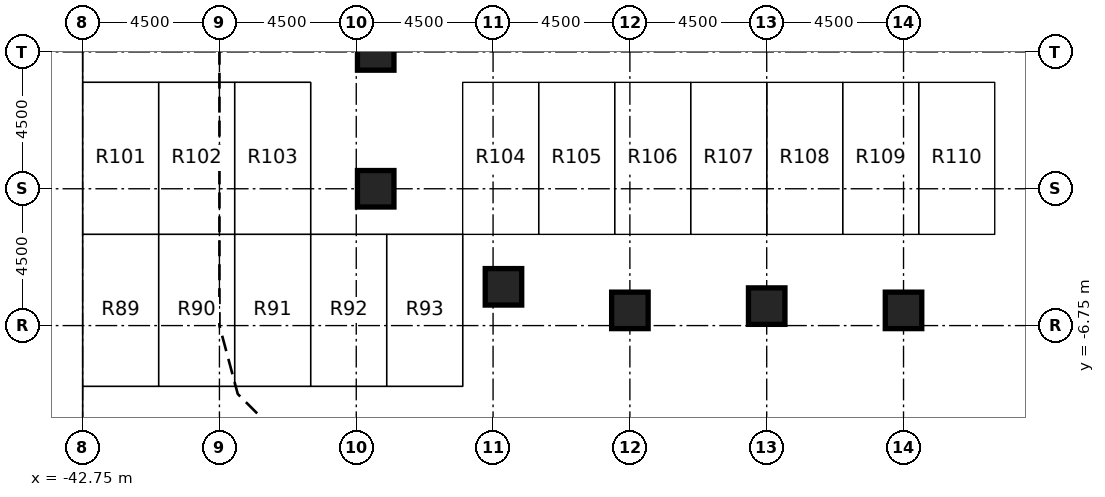
"""IFC4 building model, lengths in metres.
Left out: names, types, materials, properties, quantities, classifications, styles, units other than length and angle.
Written with IfcOpenShell. Run it as: python <this file> out.ifc"""

import sys

from ifc_helpers import new_model, si_unit, direction, frame, origin, origin_2d, place, context, subcontext, project, spatial, rectangle, extrude, element, save


model = new_model("IFC4")
c1 = context("Model", 3, precision=1e-05, world=origin(), true_north=direction((0.0, 1.0)))
c2 = subcontext(c1, "Body", "Model", "MODEL_VIEW")
j1 = project(units=[si_unit("LENGTHUNIT", "METRE"), si_unit("PLANEANGLEUNIT", "RADIAN")], contexts=[c1])
p1 = place(None, origin())
s1 = spatial("IfcSite", under=j1, at=p1, CompositionType="ELEMENT")
p2 = place(p1, origin())
s2 = spatial("IfcBuilding", under=s1, at=p2, CompositionType="ELEMENT")
p3 = place(p2, frame((0.0, 0.0, -8.0)))
s3 = spatial("IfcBuildingStorey", under=s2, at=p3, CompositionType="ELEMENT", Elevation=-8.0)
for number, where, z_axis, x_axis in (
    (1, (-33.11, -2.25, 0.0), (0.0, 0.0, 1.0), (1.0, 0.0, 0.0)),
    (2, (-33.11, 2.25, 0.0), (0.0, 0.0, 1.0), (1.0, 0.0, 0.0)),
    (3, (-28.908, -5.475, 0.0), (0.0, 0.0, 1.0), (1.0, 0.0, 0.0)),
    (4, (-24.75, -6.25, 0.0), (0.0, 0.0, 1.0), (1.0, 0.0, 0.0)),
    (5, (-20.25, -6.11, 0.0), (0.0, 0.0, 1.0), (1.0, 0.0, 0.0)),
    (6, (-15.75, -6.25, 0.0), (0.0, 0.0, 1.0), (1.0, 0.0, 0.0)),
):
    element("IfcColumn", number, at=place(p3, frame(where, z_axis=z_axis, x_axis=x_axis)), inside=s3, PredefinedType="COLUMN", context=c2, shape_type="SweptSolid", body=[
        extrude(rectangle(XDim=1.2, YDim=1.2, at=origin_2d()), origin(), (0.0, 0.0, 1.0), 3.4),
    ])
save(model, sys.argv[1])
